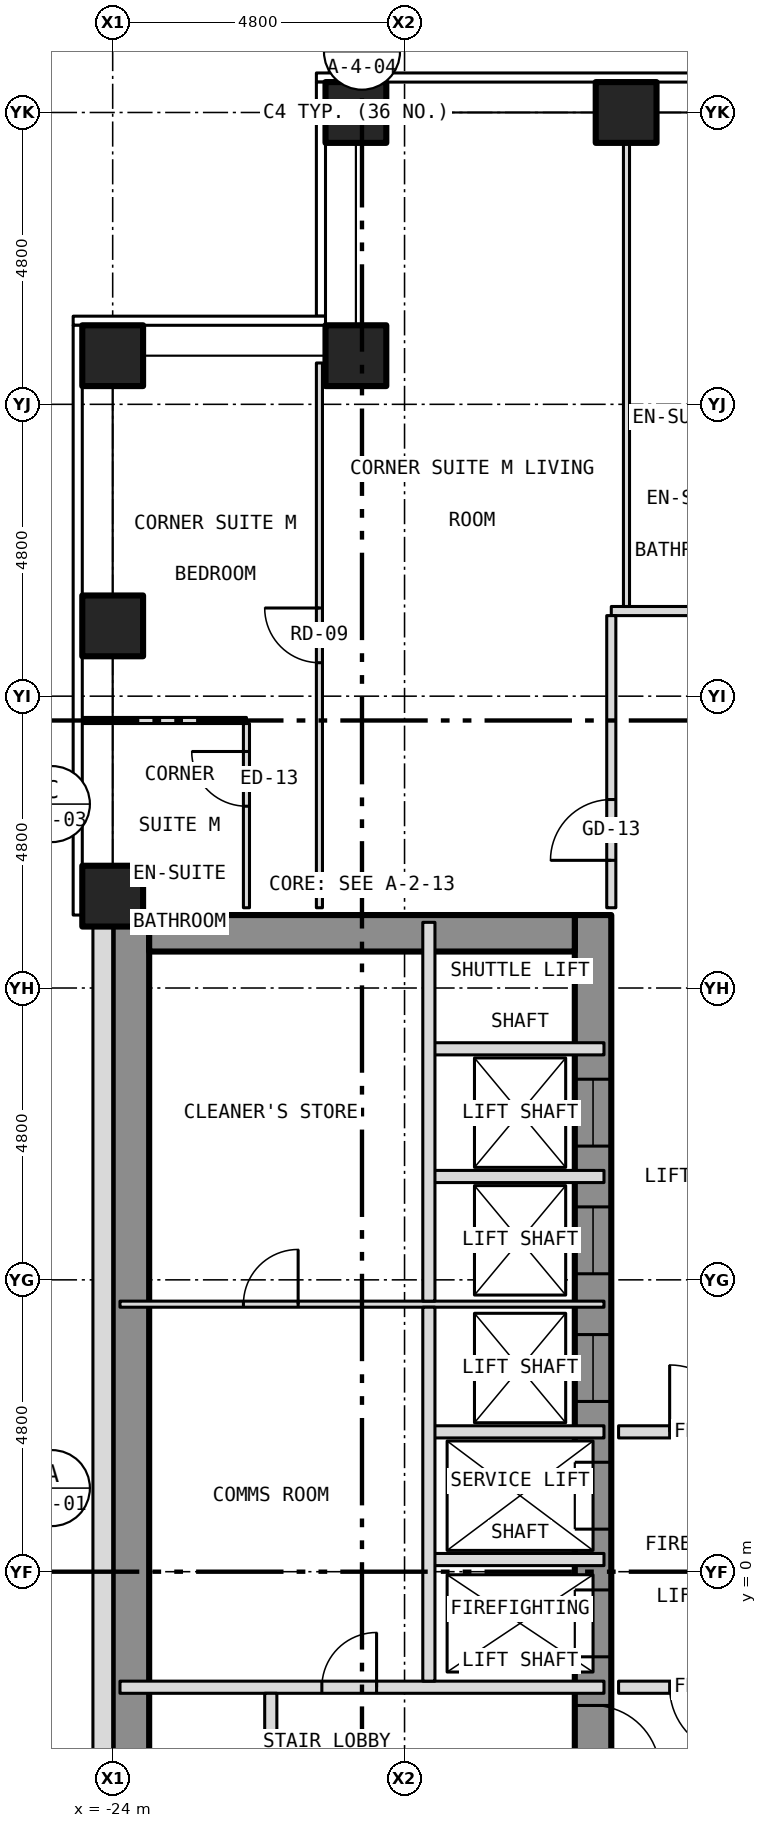
"""IFC4 building model, lengths in metres.
Left out: names, types, materials, properties, quantities, classifications, styles, units other than length and angle.
Written with IfcOpenShell. Run it as: python <this file> out.ifc"""

import sys

from ifc_helpers import new_model, si_unit, direction, frame, frame_2d, origin, origin_2d, place, context, subcontext, project, spatial, rectangle, hollow_rectangle, extrude, element, fill, save


model = new_model("IFC4")
c1 = context("Model", 3, precision=1e-05, world=origin(), true_north=direction((0.0, 1.0)))
c2 = subcontext(c1, "Body", "Model", "MODEL_VIEW")
j1 = project(units=[si_unit("LENGTHUNIT", "METRE"), si_unit("PLANEANGLEUNIT", "RADIAN")], contexts=[c1])
p1 = place(None, origin())
s1 = spatial("IfcSite", under=j1, at=p1, CompositionType="ELEMENT")
p2 = place(p1, origin())
s2 = spatial("IfcBuilding", under=s1, at=p2, CompositionType="ELEMENT")
p3 = place(p2, frame((0.0, 0.0, 49.5)))
s3 = spatial("IfcBuildingStorey", under=s2, at=p3, CompositionType="ELEMENT", Elevation=49.5)
for number, where, z_axis, x_axis in (
    (1, (-20.0, 24.0, -0.15), (0.0, 0.0, 1.0), (1.0, 0.0, 0.0)),
    (2, (-15.556, 24.0, -0.15), (0.0, 0.0, 1.0), (1.0, 0.0, 0.0)),
    (3, (-24.0, 11.111, -0.15), (0.0, 0.0, 1.0), (1.0, 0.0, 0.0)),
    (4, (-24.0, 15.556, -0.15), (0.0, 0.0, 1.0), (1.0, 0.0, 0.0)),
    (5, (-24.0, 20.0, -0.15), (0.0, 0.0, 1.0), (1.0, 0.0, 0.0)),
    (6, (-20.0, 20.0, -0.15), (0.0, 0.0, 1.0), (1.0, 0.0, 0.0)),
):
    element("IfcColumn", number, at=place(p3, frame(where, z_axis=z_axis, x_axis=x_axis)), inside=s3, PredefinedType="COLUMN", context=c2, shape_type="SweptSolid", body=[
        extrude(hollow_rectangle(XDim=1.0, YDim=1.0, WallThickness=0.06, at=origin_2d()), origin(), (0.0, 0.0, 1.0), 3.5),
    ])
p4 = place(p3, frame((-16.1, -10.8, 0.0), z_axis=(0.0, 0.0, 1.0), x_axis=(0.0, 1.0, 0.0)))
e7 = element("IfcWall", 7, at=p4, inside=s3, PredefinedType="SHEAR", context=c2, shape_type="SweptSolid", body=[
    extrude(rectangle(XDim=21.6, YDim=0.6, at=frame_2d((10.8, 0.0))), origin(), (0.0, 0.0, 1.0), 3.25),
])
p5 = place(p4, frame((9.4, 0.0, 0.0)))
e8 = element("IfcOpeningElement", 8, at=p5, cuts=e7, PredefinedType="OPENING", context=c2, shape_type="SweptSolid", body=[
    extrude(rectangle(XDim=1.1, YDim=2.1, at=frame_2d((0.55, 1.05))), frame((0.0, 0.312, 0.0), z_axis=(0.0, -1.0, 0.0), x_axis=(1.0, 0.0, 0.0)), (0.0, 0.0, 1.0), 0.624),
])
p6 = place(p4, frame((11.5, 0.0, 0.0)))
e9 = element("IfcOpeningElement", 9, at=p6, cuts=e7, PredefinedType="OPENING", context=c2, shape_type="SweptSolid", body=[
    extrude(rectangle(XDim=1.1, YDim=2.1, at=frame_2d((0.55, 1.05))), frame((0.0, 0.312, 0.0), z_axis=(0.0, -1.0, 0.0), x_axis=(1.0, 0.0, 0.0)), (0.0, 0.0, 1.0), 0.624),
])
p7 = place(p4, frame((13.6, 0.0, 0.0)))
e10 = element("IfcOpeningElement", 10, at=p7, cuts=e7, PredefinedType="OPENING", context=c2, shape_type="SweptSolid", body=[
    extrude(rectangle(XDim=1.1, YDim=2.1, at=frame_2d((0.55, 1.05))), frame((0.0, 0.312, 0.0), z_axis=(0.0, -1.0, 0.0), x_axis=(1.0, 0.0, 0.0)), (0.0, 0.0, 1.0), 0.624),
])
p8 = place(p4, frame((15.7, 0.0, 0.0)))
e11 = element("IfcOpeningElement", 11, at=p8, cuts=e7, PredefinedType="OPENING", context=c2, shape_type="SweptSolid", body=[
    extrude(rectangle(XDim=1.1, YDim=2.1, at=frame_2d((0.55, 1.05))), frame((0.0, 0.312, 0.0), z_axis=(0.0, -1.0, 0.0), x_axis=(1.0, 0.0, 0.0)), (0.0, 0.0, 1.0), 0.624),
])
p9 = place(p4, frame((17.8, 0.0, 0.0)))
e12 = element("IfcOpeningElement", 12, at=p9, cuts=e7, PredefinedType="OPENING", context=c2, shape_type="SweptSolid", body=[
    extrude(rectangle(XDim=1.1, YDim=2.1, at=frame_2d((0.55, 1.05))), frame((0.0, 0.312, 0.0), z_axis=(0.0, -1.0, 0.0), x_axis=(1.0, 0.0, 0.0)), (0.0, 0.0, 1.0), 0.624),
])
p10 = place(p4, frame((0.758, 0.0, 0.0)))
e13 = element("IfcOpeningElement", 13, at=p10, cuts=e7, PredefinedType="OPENING", context=c2, shape_type="SweptSolid", body=[
    extrude(rectangle(XDim=1.1, YDim=2.1, at=frame_2d((0.55, 1.05))), frame((0.0, 0.312, 0.0), z_axis=(0.0, -1.0, 0.0), x_axis=(1.0, 0.0, 0.0)), (0.0, 0.0, 1.0), 0.624),
])
p11 = place(p4, frame((7.5, 0.0, 0.0)))
e14 = element("IfcOpeningElement", 14, at=p11, cuts=e7, PredefinedType="OPENING", context=c2, shape_type="SweptSolid", body=[
    extrude(rectangle(XDim=1.1, YDim=2.1, at=frame_2d((0.55, 1.05))), frame((0.0, 0.312, 0.0), z_axis=(0.0, -1.0, 0.0), x_axis=(1.0, 0.0, 0.0)), (0.0, 0.0, 1.0), 0.624),
])
p12 = place(p3, frame((-23.7, -10.8, 0.0), z_axis=(0.0, 0.0, 1.0), x_axis=(0.0, 1.0, 0.0)))
e15 = element("IfcWall", 15, at=p12, inside=s3, PredefinedType="SHEAR", context=c2, shape_type="SweptSolid", body=[
    extrude(rectangle(XDim=21.6, YDim=0.6, at=frame_2d((10.8, 0.0))), origin(), (0.0, 0.0, 1.0), 3.25),
])
p13 = place(p3, frame((-23.4, 10.5, 0.0), z_axis=(0.0, 0.0, 1.0), x_axis=(1.0, 0.0, 0.0)))
e16 = element("IfcWall", 16, at=p13, inside=s3, PredefinedType="SHEAR", context=c2, shape_type="SweptSolid", body=[
    extrude(rectangle(XDim=7.0, YDim=0.6, at=frame_2d((3.5, 0.0))), origin(), (0.0, 0.0, 1.0), 3.25),
])
p14 = place(p3, frame((-24.163, 10.8, 0.0), z_axis=(0.0, 0.0, 1.0), x_axis=(0.0, -1.0, 0.0)))
e17 = element("IfcWall", 17, at=p14, inside=s3, PredefinedType="SOLIDWALL", context=c2, shape_type="SweptSolid", body=[
    extrude(rectangle(XDim=21.6, YDim=0.325, at=frame_2d((10.8, 0.0))), origin(), (0.0, 0.0, 1.0), 3.5),
])
p15 = place(p14, frame((18.05, 0.0, 1.0)))
e18 = element("IfcOpeningElement", 18, at=p15, cuts=e17, PredefinedType="OPENING", context=c2, shape_type="SweptSolid", body=[
    extrude(rectangle(XDim=0.6, YDim=1.5, at=frame_2d((0.3, 0.75))), frame((0.0, 0.175, 0.0), z_axis=(0.0, -1.0, 0.0), x_axis=(1.0, 0.0, 0.0)), (0.0, 0.0, 1.0), 0.349),
])
p16 = place(p3, frame((-23.88, -1.9, 0.0), z_axis=(0.0, 0.0, 1.0), x_axis=(1.0, 0.0, 0.0)))
e19 = element("IfcWall", 19, at=p16, inside=s3, PredefinedType="PARTITIONING", context=c2, shape_type="SweptSolid", body=[
    extrude(rectangle(XDim=7.96, YDim=0.2, at=frame_2d((3.98, 0.0))), origin(), (0.0, 0.0, 1.0), 3.25),
])
p17 = place(p16, frame((3.32, 0.0, 0.0)))
e20 = element("IfcOpeningElement", 20, at=p17, cuts=e19, PredefinedType="OPENING", context=c2, shape_type="SweptSolid", body=[
    extrude(rectangle(XDim=0.9, YDim=2.1, at=frame_2d((0.45, 1.05))), frame((0.0, 0.112, 0.0), z_axis=(0.0, -1.0, 0.0), x_axis=(1.0, 0.0, 0.0)), (0.0, 0.0, 1.0), 0.224),
])
p18 = place(p3, frame((-15.68, -1.9, 0.0), z_axis=(0.0, 0.0, 1.0), x_axis=(1.0, 0.0, 0.0)))
e21 = element("IfcWall", 21, at=p18, inside=s3, PredefinedType="PARTITIONING", context=c2, shape_type="SweptSolid", body=[
    extrude(rectangle(XDim=3.28, YDim=0.2, at=frame_2d((1.64, 0.0))), origin(), (0.0, 0.0, 1.0), 3.35),
])
p19 = place(p18, frame((0.84, 0.0, 0.0)))
e22 = element("IfcOpeningElement", 22, at=p19, cuts=e21, PredefinedType="OPENING", context=c2, shape_type="SweptSolid", body=[
    extrude(rectangle(XDim=1.1, YDim=2.1, at=frame_2d((0.55, 1.05))), frame((0.0, 0.112, 0.0), z_axis=(0.0, -1.0, 0.0), x_axis=(1.0, 0.0, 0.0)), (0.0, 0.0, 1.0), 0.224),
])
for number, where, z_axis, x_axis in (
    (23, (-18.8, 0.2, 0.0), (0.0, 0.0, 1.0), (1.0, 0.0, 0.0)),
    (24, (-18.8, 2.3, 0.0), (0.0, 0.0, 1.0), (1.0, 0.0, 0.0)),
):
    element("IfcWall", number, at=place(p3, frame(where, z_axis=z_axis, x_axis=x_axis)), inside=s3, PredefinedType="PARTITIONING", context=c2, shape_type="SweptSolid", body=[
        extrude(rectangle(XDim=2.88, YDim=0.2, at=frame_2d((1.44, 0.0))), origin(), (0.0, 0.0, 1.0), 3.25),
    ])
p20 = place(p3, frame((-15.68, 2.3, 0.0), z_axis=(0.0, 0.0, 1.0), x_axis=(1.0, 0.0, 0.0)))
e25 = element("IfcWall", 25, at=p20, inside=s3, PredefinedType="PARTITIONING", context=c2, shape_type="SweptSolid", body=[
    extrude(rectangle(XDim=3.28, YDim=0.2, at=frame_2d((1.64, 0.0))), origin(), (0.0, 0.0, 1.0), 3.35),
])
p21 = place(p20, frame((0.84, 0.0, 0.0)))
e26 = element("IfcOpeningElement", 26, at=p21, cuts=e25, PredefinedType="OPENING", context=c2, shape_type="SweptSolid", body=[
    extrude(rectangle(XDim=1.1, YDim=2.1, at=frame_2d((0.55, 1.05))), frame((0.0, 0.112, 0.0), z_axis=(0.0, -1.0, 0.0), x_axis=(1.0, 0.0, 0.0)), (0.0, 0.0, 1.0), 0.224),
])
p22 = place(p3, frame((-23.88, 4.4, 0.0), z_axis=(0.0, 0.0, 1.0), x_axis=(1.0, 0.0, 0.0)))
e27 = element("IfcWall", 27, at=p22, inside=s3, PredefinedType="PARTITIONING", context=c2, shape_type="SweptSolid", body=[
    extrude(rectangle(XDim=7.96, YDim=0.1, at=frame_2d((3.98, 0.0))), origin(), (0.0, 0.0, 1.0), 3.25),
])
p23 = place(p22, frame((2.03, 0.0, 0.0)))
e28 = element("IfcOpeningElement", 28, at=p23, cuts=e27, PredefinedType="OPENING", context=c2, shape_type="SweptSolid", body=[
    extrude(rectangle(XDim=0.9, YDim=2.1, at=frame_2d((0.45, 1.05))), frame((0.0, 0.062, 0.0), z_axis=(0.0, -1.0, 0.0), x_axis=(1.0, 0.0, 0.0)), (0.0, 0.0, 1.0), 0.124),
])
for number, where, z_axis, x_axis in (
    (29, (-18.8, 6.5, 0.0), (0.0, 0.0, 1.0), (1.0, 0.0, 0.0)),
    (30, (-18.8, 8.6, 0.0), (0.0, 0.0, 1.0), (1.0, 0.0, 0.0)),
):
    element("IfcWall", number, at=place(p3, frame(where, z_axis=z_axis, x_axis=x_axis)), inside=s3, PredefinedType="PARTITIONING", context=c2, shape_type="SweptSolid", body=[
        extrude(rectangle(XDim=2.88, YDim=0.2, at=frame_2d((1.44, 0.0))), origin(), (0.0, 0.0, 1.0), 3.25),
    ])
p24 = place(p3, frame((-24.53, 14.0, 0.0), z_axis=(0.0, 0.0, 1.0), x_axis=(1.0, 0.0, 0.0)))
e31 = element("IfcWall", 31, at=p24, inside=s3, PredefinedType="PARTITIONING", context=c2, shape_type="SweptSolid", body=[
    extrude(rectangle(XDim=2.73, YDim=0.1, at=frame_2d((1.365, 0.0))), origin(), (0.0, 0.0, 1.0), 3.35),
])
p25 = place(p3, frame((-15.8, 15.8, 0.0), z_axis=(0.0, 0.0, 1.0), x_axis=(1.0, 0.0, 0.0)))
e32 = element("IfcWall", 32, at=p25, inside=s3, PredefinedType="PARTITIONING", context=c2, shape_type="SweptSolid", body=[
    extrude(rectangle(XDim=31.6, YDim=0.15, at=frame_2d((15.8, 0.0))), origin(), (0.0, 0.0, 1.0), 3.35),
])
p26 = place(p25, frame((4.178, 0.0, 0.0)))
e33 = element("IfcOpeningElement", 33, at=p26, cuts=e32, PredefinedType="OPENING", context=c2, shape_type="SweptSolid", body=[
    extrude(rectangle(XDim=1.0, YDim=2.1, at=frame_2d((0.5, 1.05))), frame((0.0, 0.087, 0.0), z_axis=(0.0, -1.0, 0.0), x_axis=(1.0, 0.0, 0.0)), (0.0, 0.0, 1.0), 0.174),
])
p27 = place(p25, frame((9.734, 0.0, 0.0)))
e34 = element("IfcOpeningElement", 34, at=p27, cuts=e32, PredefinedType="OPENING", context=c2, shape_type="SweptSolid", body=[
    extrude(rectangle(XDim=1.0, YDim=2.1, at=frame_2d((0.5, 1.05))), frame((0.0, 0.087, 0.0), z_axis=(0.0, -1.0, 0.0), x_axis=(1.0, 0.0, 0.0)), (0.0, 0.0, 1.0), 0.174),
])
p28 = place(p25, frame((14.178, 0.0, 0.0)))
e35 = element("IfcOpeningElement", 35, at=p28, cuts=e32, PredefinedType="OPENING", context=c2, shape_type="SweptSolid", body=[
    extrude(rectangle(XDim=1.0, YDim=2.1, at=frame_2d((0.5, 1.05))), frame((0.0, 0.087, 0.0), z_axis=(0.0, -1.0, 0.0), x_axis=(1.0, 0.0, 0.0)), (0.0, 0.0, 1.0), 0.174),
])
p29 = place(p25, frame((17.534, 0.0, 0.0)))
e36 = element("IfcOpeningElement", 36, at=p29, cuts=e32, PredefinedType="OPENING", context=c2, shape_type="SweptSolid", body=[
    extrude(rectangle(XDim=1.0, YDim=2.1, at=frame_2d((0.5, 1.05))), frame((0.0, 0.087, 0.0), z_axis=(0.0, -1.0, 0.0), x_axis=(1.0, 0.0, 0.0)), (0.0, 0.0, 1.0), 0.174),
])
p30 = place(p25, frame((25.289, 0.0, 0.0)))
e37 = element("IfcOpeningElement", 37, at=p30, cuts=e32, PredefinedType="OPENING", context=c2, shape_type="SweptSolid", body=[
    extrude(rectangle(XDim=1.0, YDim=2.1, at=frame_2d((0.5, 1.05))), frame((0.0, 0.087, 0.0), z_axis=(0.0, -1.0, 0.0), x_axis=(1.0, 0.0, 0.0)), (0.0, 0.0, 1.0), 0.174),
])
p31 = place(p25, frame((29.733, 0.0, 0.0)))
e38 = element("IfcOpeningElement", 38, at=p31, cuts=e32, PredefinedType="OPENING", context=c2, shape_type="SweptSolid", body=[
    extrude(rectangle(XDim=1.0, YDim=2.1, at=frame_2d((0.5, 1.05))), frame((0.0, 0.087, 0.0), z_axis=(0.0, -1.0, 0.0), x_axis=(1.0, 0.0, 0.0)), (0.0, 0.0, 1.0), 0.174),
])
p32 = place(p3, frame((-15.55, 19.0, 0.0), z_axis=(0.0, 0.0, 1.0), x_axis=(1.0, 0.0, 0.0)))
e39 = element("IfcWall", 39, at=p32, inside=s3, PredefinedType="PARTITIONING", context=c2, shape_type="SweptSolid", body=[
    extrude(rectangle(XDim=2.2, YDim=0.1, at=frame_2d((1.1, 0.0))), origin(), (0.0, 0.0, 1.0), 3.35),
])
p33 = place(p3, frame((-21.8, 10.92, 0.0), z_axis=(0.0, 0.0, 1.0), x_axis=(0.0, 1.0, 0.0)))
e40 = element("IfcWall", 40, at=p33, inside=s3, PredefinedType="PARTITIONING", context=c2, shape_type="SweptSolid", body=[
    extrude(rectangle(XDim=3.03, YDim=0.1, at=frame_2d((1.515, 0.0))), origin(), (0.0, 0.0, 1.0), 3.35),
])
p34 = place(p33, frame((1.67, 0.0, 0.0)))
e41 = element("IfcOpeningElement", 41, at=p34, cuts=e40, PredefinedType="OPENING", context=c2, shape_type="SweptSolid", body=[
    extrude(rectangle(XDim=0.9, YDim=2.1, at=frame_2d((0.45, 1.05))), frame((0.0, 0.062, 0.0), z_axis=(0.0, -1.0, 0.0), x_axis=(1.0, 0.0, 0.0)), (0.0, 0.0, 1.0), 0.124),
])
p35 = place(p3, frame((-21.4, -10.68, 0.0), z_axis=(0.0, 0.0, 1.0), x_axis=(0.0, 1.0, 0.0)))
e42 = element("IfcWall", 42, at=p35, inside=s3, PredefinedType="PARTITIONING", context=c2, shape_type="SweptSolid", body=[
    extrude(rectangle(XDim=8.68, YDim=0.2, at=frame_2d((4.34, 0.0))), origin(), (0.0, 0.0, 1.0), 3.25),
])
p36 = place(p35, frame((3.88, 0.0, 0.0)))
e43 = element("IfcOpeningElement", 43, at=p36, cuts=e42, PredefinedType="OPENING", context=c2, shape_type="SweptSolid", body=[
    extrude(rectangle(XDim=0.9, YDim=2.1, at=frame_2d((0.45, 1.05))), frame((0.0, 0.112, 0.0), z_axis=(0.0, -1.0, 0.0), x_axis=(1.0, 0.0, 0.0)), (0.0, 0.0, 1.0), 0.224),
])
p37 = place(p3, frame((-20.6, 10.92, 0.0), z_axis=(0.0, 0.0, 1.0), x_axis=(0.0, 1.0, 0.0)))
e44 = element("IfcWall", 44, at=p37, inside=s3, PredefinedType="PARTITIONING", context=c2, shape_type="SweptSolid", body=[
    extrude(rectangle(XDim=8.96, YDim=0.1, at=frame_2d((4.48, 0.0))), origin(), (0.0, 0.0, 1.0), 3.35),
])
p38 = place(p37, frame((4.03, 0.0, 0.0)))
e45 = element("IfcOpeningElement", 45, at=p38, cuts=e44, PredefinedType="OPENING", context=c2, shape_type="SweptSolid", body=[
    extrude(rectangle(XDim=0.9, YDim=2.1, at=frame_2d((0.45, 1.05))), frame((0.0, 0.062, 0.0), z_axis=(0.0, -1.0, 0.0), x_axis=(1.0, 0.0, 0.0)), (0.0, 0.0, 1.0), 0.124),
])
p39 = place(p3, frame((-18.8, -1.8, 0.0), z_axis=(0.0, 0.0, 1.0), x_axis=(0.0, 1.0, 0.0)))
e46 = element("IfcWall", 46, at=p39, inside=s3, PredefinedType="PARTITIONING", context=c2, shape_type="SweptSolid", body=[
    extrude(rectangle(XDim=6.15, YDim=0.2, at=frame_2d((3.075, 0.0))), origin(), (0.0, 0.0, 1.0), 3.25),
])
p40 = place(p3, frame((-18.8, 4.45, 0.0), z_axis=(0.0, 0.0, 1.0), x_axis=(0.0, 1.0, 0.0)))
e47 = element("IfcWall", 47, at=p40, inside=s3, PredefinedType="PARTITIONING", context=c2, shape_type="SweptSolid", body=[
    extrude(rectangle(XDim=6.23, YDim=0.2, at=frame_2d((3.115, 0.0))), origin(), (0.0, 0.0, 1.0), 3.25),
])
p41 = place(p3, frame((-15.8, 10.92, 0.0), z_axis=(0.0, 0.0, 1.0), x_axis=(0.0, 1.0, 0.0)))
e48 = element("IfcWall", 48, at=p41, inside=s3, PredefinedType="PARTITIONING", context=c2, shape_type="SweptSolid", body=[
    extrude(rectangle(XDim=4.805, YDim=0.15, at=frame_2d((2.403, 0.0))), origin(), (0.0, 0.0, 1.0), 3.35),
])
p42 = place(p41, frame((0.78, 0.0, 0.0)))
e49 = element("IfcOpeningElement", 49, at=p42, cuts=e48, PredefinedType="OPENING", context=c2, shape_type="SweptSolid", body=[
    extrude(rectangle(XDim=1.0, YDim=2.1, at=frame_2d((0.5, 1.05))), frame((0.0, 0.087, 0.0), z_axis=(0.0, -1.0, 0.0), x_axis=(1.0, 0.0, 0.0)), (0.0, 0.0, 1.0), 0.174),
])
p43 = place(p3, frame((-15.55, 15.875, 0.0), z_axis=(0.0, 0.0, 1.0), x_axis=(0.0, 1.0, 0.0)))
e50 = element("IfcWall", 50, at=p43, inside=s3, PredefinedType="PARTITIONING", context=c2, shape_type="SweptSolid", body=[
    extrude(rectangle(XDim=8.005, YDim=0.1, at=frame_2d((4.002, 0.0))), origin(), (0.0, 0.0, 1.0), 3.35),
])
p44 = place(p5, origin())
e51 = element("IfcDoor", 51, at=p44, inside=s3, OperationType="SLIDING_TO_LEFT", PredefinedType="DOOR", context=c2, shape_type="SweptSolid", body=[
    extrude(rectangle(XDim=1.1, YDim=2.1, at=frame_2d((0.55, 1.05))), frame((0.0, 0.025, 0.0), z_axis=(0.0, -1.0, 0.0), x_axis=(1.0, 0.0, 0.0)), (0.0, 0.0, 1.0), 0.05),
])
fill(e8, e51)
p45 = place(p6, origin())
e52 = element("IfcDoor", 52, at=p45, inside=s3, OperationType="SLIDING_TO_LEFT", PredefinedType="DOOR", context=c2, shape_type="SweptSolid", body=[
    extrude(rectangle(XDim=1.1, YDim=2.1, at=frame_2d((0.55, 1.05))), frame((0.0, 0.025, 0.0), z_axis=(0.0, -1.0, 0.0), x_axis=(1.0, 0.0, 0.0)), (0.0, 0.0, 1.0), 0.05),
])
fill(e9, e52)
p46 = place(p7, origin())
e53 = element("IfcDoor", 53, at=p46, inside=s3, OperationType="SLIDING_TO_LEFT", PredefinedType="DOOR", context=c2, shape_type="SweptSolid", body=[
    extrude(rectangle(XDim=1.1, YDim=2.1, at=frame_2d((0.55, 1.05))), frame((0.0, 0.025, 0.0), z_axis=(0.0, -1.0, 0.0), x_axis=(1.0, 0.0, 0.0)), (0.0, 0.0, 1.0), 0.05),
])
fill(e10, e53)
p47 = place(p8, origin())
e54 = element("IfcDoor", 54, at=p47, inside=s3, OperationType="SLIDING_TO_LEFT", PredefinedType="DOOR", context=c2, shape_type="SweptSolid", body=[
    extrude(rectangle(XDim=1.1, YDim=2.1, at=frame_2d((0.55, 1.05))), frame((0.0, 0.025, 0.0), z_axis=(0.0, -1.0, 0.0), x_axis=(1.0, 0.0, 0.0)), (0.0, 0.0, 1.0), 0.05),
])
fill(e11, e54)
p48 = place(p9, origin())
e55 = element("IfcDoor", 55, at=p48, inside=s3, OperationType="SLIDING_TO_LEFT", PredefinedType="DOOR", context=c2, shape_type="SweptSolid", body=[
    extrude(rectangle(XDim=1.1, YDim=2.1, at=frame_2d((0.55, 1.05))), frame((0.0, 0.025, 0.0), z_axis=(0.0, -1.0, 0.0), x_axis=(1.0, 0.0, 0.0)), (0.0, 0.0, 1.0), 0.05),
])
fill(e12, e55)
p49 = place(p11, origin())
e56 = element("IfcDoor", 56, at=p49, inside=s3, OperationType="SINGLE_SWING_LEFT", PredefinedType="DOOR", context=c2, shape_type="SweptSolid", body=[
    extrude(rectangle(XDim=1.1, YDim=2.1, at=frame_2d((0.55, 1.05))), frame((0.0, 0.025, 0.0), z_axis=(0.0, -1.0, 0.0), x_axis=(1.0, 0.0, 0.0)), (0.0, 0.0, 1.0), 0.05),
])
fill(e14, e56)
p50 = place(p17, origin())
e57 = element("IfcDoor", 57, at=p50, inside=s3, OperationType="SINGLE_SWING_RIGHT", PredefinedType="DOOR", context=c2, shape_type="SweptSolid", body=[
    extrude(rectangle(XDim=0.9, YDim=2.1, at=frame_2d((0.45, 1.05))), frame((0.0, 0.025, 0.0), z_axis=(0.0, -1.0, 0.0), x_axis=(1.0, 0.0, 0.0)), (0.0, 0.0, 1.0), 0.05),
])
fill(e20, e57)
p51 = place(p23, origin())
e58 = element("IfcDoor", 58, at=p51, inside=s3, OperationType="SINGLE_SWING_RIGHT", PredefinedType="DOOR", context=c2, shape_type="SweptSolid", body=[
    extrude(rectangle(XDim=0.9, YDim=2.1, at=frame_2d((0.45, 1.05))), frame((0.0, 0.025, 0.0), z_axis=(0.0, -1.0, 0.0), x_axis=(1.0, 0.0, 0.0)), (0.0, 0.0, 1.0), 0.05),
])
fill(e28, e58)
p52 = place(p21, origin())
e59 = element("IfcDoor", 59, at=p52, inside=s3, OperationType="SINGLE_SWING_LEFT", PredefinedType="DOOR", context=c2, shape_type="SweptSolid", body=[
    extrude(rectangle(XDim=1.1, YDim=2.1, at=frame_2d((0.55, 1.05))), frame((0.0, 0.025, 0.0), z_axis=(0.0, -1.0, 0.0), x_axis=(1.0, 0.0, 0.0)), (0.0, 0.0, 1.0), 0.05),
])
fill(e26, e59)
p53 = place(p19, origin())
e60 = element("IfcDoor", 60, at=p53, inside=s3, OperationType="SINGLE_SWING_RIGHT", PredefinedType="DOOR", context=c2, shape_type="SweptSolid", body=[
    extrude(rectangle(XDim=1.1, YDim=2.1, at=frame_2d((0.55, 1.05))), frame((0.0, 0.025, 0.0), z_axis=(0.0, -1.0, 0.0), x_axis=(1.0, 0.0, 0.0)), (0.0, 0.0, 1.0), 0.05),
])
fill(e22, e60)
p54 = place(p42, origin())
e61 = element("IfcDoor", 61, at=p54, inside=s3, OperationType="SINGLE_SWING_LEFT", PredefinedType="DOOR", context=c2, shape_type="SweptSolid", body=[
    extrude(rectangle(XDim=1.0, YDim=2.1, at=frame_2d((0.5, 1.05))), frame((0.0, 0.025, 0.0), z_axis=(0.0, -1.0, 0.0), x_axis=(1.0, 0.0, 0.0)), (0.0, 0.0, 1.0), 0.05),
])
fill(e49, e61)
p55 = place(p38, origin())
e62 = element("IfcDoor", 62, at=p55, inside=s3, OperationType="SINGLE_SWING_RIGHT", PredefinedType="DOOR", context=c2, shape_type="SweptSolid", body=[
    extrude(rectangle(XDim=0.9, YDim=2.1, at=frame_2d((0.45, 1.05))), frame((0.0, 0.025, 0.0), z_axis=(0.0, -1.0, 0.0), x_axis=(1.0, 0.0, 0.0)), (0.0, 0.0, 1.0), 0.05),
])
fill(e45, e62)
p56 = place(p34, origin())
e63 = element("IfcDoor", 63, at=p56, inside=s3, OperationType="SINGLE_SWING_RIGHT", PredefinedType="DOOR", context=c2, shape_type="SweptSolid", body=[
    extrude(rectangle(XDim=0.9, YDim=2.1, at=frame_2d((0.45, 1.05))), frame((0.0, 0.025, 0.0), z_axis=(0.0, -1.0, 0.0), x_axis=(1.0, 0.0, 0.0)), (0.0, 0.0, 1.0), 0.05),
])
fill(e41, e63)
save(model, sys.argv[1])
